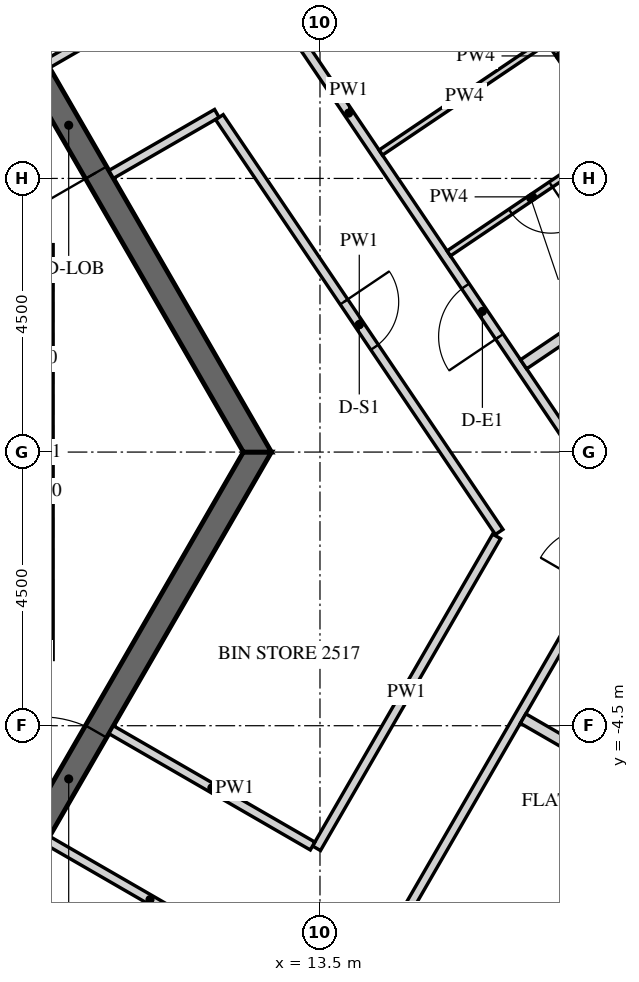
"""IFC4 building model, lengths in metres.
Left out: names, types, materials, properties, quantities, classifications, styles, units other than length and angle.
Written with IfcOpenShell. Run it as: python <this file> out.ifc"""

import sys

from ifc_helpers import new_model, si_unit, direction, frame, frame_2d, origin, place, context, subcontext, project, spatial, polyline, rectangle, outline, extrude, element, fill, save


model = new_model("IFC4")
c1 = context("Model", 3, precision=1e-05, world=origin(), true_north=direction((0.0, 1.0)))
c2 = subcontext(c1, "Body", "Model", "MODEL_VIEW")
j1 = project(units=[si_unit("LENGTHUNIT", "METRE"), si_unit("PLANEANGLEUNIT", "RADIAN")], contexts=[c1])
p1 = place(None, origin())
s1 = spatial("IfcSite", under=j1, at=p1, CompositionType="ELEMENT")
p2 = place(p1, origin())
s2 = spatial("IfcBuilding", under=s1, at=p2, CompositionType="ELEMENT")
p3 = place(p2, frame((0.0, 0.0, 314.7)))
s3 = spatial("IfcBuildingStorey", under=s2, at=p3, CompositionType="ELEMENT", Elevation=314.7)
p4 = place(p3, frame((16.451, -23.005, -0.15), z_axis=(0.0, 0.0, 1.0), x_axis=(0.500003737743, 0.866023245787, 0.0)))
e1 = element("IfcWall", 1, at=p4, inside=s3, PredefinedType="SOLIDWALL", context=c2, shape_type="SweptSolid", body=[
    extrude(outline(polyline([(-0.021, -0.25), (25.468, -0.25), (25.421, 0.25), (0.021, 0.25), (-0.021, -0.25)])), origin(), (0.0, 0.0, 1.0), 3.9),
])
p5 = place(p4, frame((2.522, 0.0, 0.75)))
e2 = element("IfcOpeningElement", 2, at=p5, cuts=e1, PredefinedType="OPENING", context=c2, shape_type="SweptSolid", body=[
    extrude(rectangle(XDim=2.4, YDim=2.7, at=frame_2d((1.2, 1.35))), frame((0.0, 0.26, 0.0), z_axis=(0.0, -1.0, 0.0), x_axis=(1.0, 0.0, 0.0)), (0.0, 0.0, 1.0), 0.52),
])
p6 = place(p4, frame((6.122, 0.0, 0.75)))
e3 = element("IfcOpeningElement", 3, at=p6, cuts=e1, PredefinedType="OPENING", context=c2, shape_type="SweptSolid", body=[
    extrude(rectangle(XDim=2.4, YDim=2.7, at=frame_2d((1.2, 1.35))), frame((0.0, 0.26, 0.0), z_axis=(0.0, -1.0, 0.0), x_axis=(1.0, 0.0, 0.0)), (0.0, 0.0, 1.0), 0.52),
])
p7 = place(p4, frame((9.722, 0.0, 0.75)))
e4 = element("IfcOpeningElement", 4, at=p7, cuts=e1, PredefinedType="OPENING", context=c2, shape_type="SweptSolid", body=[
    extrude(rectangle(XDim=2.4, YDim=2.7, at=frame_2d((1.2, 1.35))), frame((0.0, 0.26, 0.0), z_axis=(0.0, -1.0, 0.0), x_axis=(1.0, 0.0, 0.0)), (0.0, 0.0, 1.0), 0.52),
])
p8 = place(p4, frame((13.323, 0.0, 0.75)))
e5 = element("IfcOpeningElement", 5, at=p8, cuts=e1, PredefinedType="OPENING", context=c2, shape_type="SweptSolid", body=[
    extrude(rectangle(XDim=2.4, YDim=2.7, at=frame_2d((1.2, 1.35))), frame((0.0, 0.26, 0.0), z_axis=(0.0, -1.0, 0.0), x_axis=(1.0, 0.0, 0.0)), (0.0, 0.0, 1.0), 0.52),
])
p9 = place(p4, frame((16.922, 0.0, 0.75)))
e6 = element("IfcOpeningElement", 6, at=p9, cuts=e1, PredefinedType="OPENING", context=c2, shape_type="SweptSolid", body=[
    extrude(rectangle(XDim=2.4, YDim=2.7, at=frame_2d((1.2, 1.35))), frame((0.0, 0.26, 0.0), z_axis=(0.0, -1.0, 0.0), x_axis=(1.0, 0.0, 0.0)), (0.0, 0.0, 1.0), 0.52),
])
p10 = place(p4, frame((20.522, 0.0, 0.75)))
e7 = element("IfcOpeningElement", 7, at=p10, cuts=e1, PredefinedType="OPENING", context=c2, shape_type="SweptSolid", body=[
    extrude(rectangle(XDim=2.4, YDim=2.7, at=frame_2d((1.2, 1.35))), frame((0.0, 0.26, 0.0), z_axis=(0.0, -1.0, 0.0), x_axis=(1.0, 0.0, 0.0)), (0.0, 0.0, 1.0), 0.52),
])
p11 = place(p3, frame((26.706, 2.879, -0.15), z_axis=(0.0, 0.0, 1.0), x_axis=(-0.559197891507, 0.829034208061, 0.0)))
e8 = element("IfcWall", 8, at=p11, inside=s3, PredefinedType="SOLIDWALL", context=c2, shape_type="SweptSolid", body=[
    extrude(outline(polyline([(0.25, -0.25), (22.795, -0.25), (23.295, 0.25), (-0.25, 0.25), (0.25, -0.25)])), origin(), (0.0, 0.0, 1.0), 3.9),
])
p12 = place(p11, frame((1.323, 0.0, 1.05)))
e9 = element("IfcOpeningElement", 9, at=p12, cuts=e8, PredefinedType="OPENING", context=c2, shape_type="SweptSolid", body=[
    extrude(rectangle(XDim=0.9, YDim=1.5, at=frame_2d((0.45, 0.75))), frame((0.0, 0.26, 0.0), z_axis=(0.0, -1.0, 0.0), x_axis=(1.0, 0.0, 0.0)), (0.0, 0.0, 1.0), 0.52),
])
p13 = place(p11, frame((2.522, 0.0, 0.15)))
e10 = element("IfcOpeningElement", 10, at=p13, cuts=e8, PredefinedType="OPENING", context=c2, shape_type="SweptSolid", body=[
    extrude(rectangle(XDim=1.2, YDim=2.4, at=frame_2d((0.6, 1.2))), frame((0.0, 0.26, 0.0), z_axis=(0.0, -1.0, 0.0), x_axis=(1.0, 0.0, 0.0)), (0.0, 0.0, 1.0), 0.52),
])
p14 = place(p11, frame((4.922, 0.0, 1.05)))
e11 = element("IfcOpeningElement", 11, at=p14, cuts=e8, PredefinedType="OPENING", context=c2, shape_type="SweptSolid", body=[
    extrude(rectangle(XDim=0.9, YDim=1.5, at=frame_2d((0.45, 0.75))), frame((0.0, 0.26, 0.0), z_axis=(0.0, -1.0, 0.0), x_axis=(1.0, 0.0, 0.0)), (0.0, 0.0, 1.0), 0.52),
])
p15 = place(p11, frame((6.122, 0.0, 0.15)))
e12 = element("IfcOpeningElement", 12, at=p15, cuts=e8, PredefinedType="OPENING", context=c2, shape_type="SweptSolid", body=[
    extrude(rectangle(XDim=1.2, YDim=2.4, at=frame_2d((0.6, 1.2))), frame((0.0, 0.26, 0.0), z_axis=(0.0, -1.0, 0.0), x_axis=(1.0, 0.0, 0.0)), (0.0, 0.0, 1.0), 0.52),
])
p16 = place(p11, frame((8.522, 0.0, 1.05)))
e13 = element("IfcOpeningElement", 13, at=p16, cuts=e8, PredefinedType="OPENING", context=c2, shape_type="SweptSolid", body=[
    extrude(rectangle(XDim=0.9, YDim=1.5, at=frame_2d((0.45, 0.75))), frame((0.0, 0.26, 0.0), z_axis=(0.0, -1.0, 0.0), x_axis=(1.0, 0.0, 0.0)), (0.0, 0.0, 1.0), 0.52),
])
p17 = place(p11, frame((9.722, 0.0, 0.15)))
e14 = element("IfcOpeningElement", 14, at=p17, cuts=e8, PredefinedType="OPENING", context=c2, shape_type="SweptSolid", body=[
    extrude(rectangle(XDim=1.2, YDim=2.4, at=frame_2d((0.6, 1.2))), frame((0.0, 0.26, 0.0), z_axis=(0.0, -1.0, 0.0), x_axis=(1.0, 0.0, 0.0)), (0.0, 0.0, 1.0), 0.52),
])
p18 = place(p11, frame((12.122, 0.0, 1.05)))
e15 = element("IfcOpeningElement", 15, at=p18, cuts=e8, PredefinedType="OPENING", context=c2, shape_type="SweptSolid", body=[
    extrude(rectangle(XDim=0.9, YDim=1.5, at=frame_2d((0.45, 0.75))), frame((0.0, 0.26, 0.0), z_axis=(0.0, -1.0, 0.0), x_axis=(1.0, 0.0, 0.0)), (0.0, 0.0, 1.0), 0.52),
])
p19 = place(p11, frame((13.323, 0.0, 0.15)))
e16 = element("IfcOpeningElement", 16, at=p19, cuts=e8, PredefinedType="OPENING", context=c2, shape_type="SweptSolid", body=[
    extrude(rectangle(XDim=1.2, YDim=2.4, at=frame_2d((0.6, 1.2))), frame((0.0, 0.26, 0.0), z_axis=(0.0, -1.0, 0.0), x_axis=(1.0, 0.0, 0.0)), (0.0, 0.0, 1.0), 0.52),
])
p20 = place(p11, frame((15.722, 0.0, 1.05)))
e17 = element("IfcOpeningElement", 17, at=p20, cuts=e8, PredefinedType="OPENING", context=c2, shape_type="SweptSolid", body=[
    extrude(rectangle(XDim=0.9, YDim=1.5, at=frame_2d((0.45, 0.75))), frame((0.0, 0.26, 0.0), z_axis=(0.0, -1.0, 0.0), x_axis=(1.0, 0.0, 0.0)), (0.0, 0.0, 1.0), 0.52),
])
p21 = place(p11, frame((16.922, 0.0, 0.15)))
e18 = element("IfcOpeningElement", 18, at=p21, cuts=e8, PredefinedType="OPENING", context=c2, shape_type="SweptSolid", body=[
    extrude(rectangle(XDim=1.2, YDim=2.4, at=frame_2d((0.6, 1.2))), frame((0.0, 0.26, 0.0), z_axis=(0.0, -1.0, 0.0), x_axis=(1.0, 0.0, 0.0)), (0.0, 0.0, 1.0), 0.52),
])
p22 = place(p11, frame((19.323, 0.0, 1.05)))
e19 = element("IfcOpeningElement", 19, at=p22, cuts=e8, PredefinedType="OPENING", context=c2, shape_type="SweptSolid", body=[
    extrude(rectangle(XDim=0.9, YDim=1.5, at=frame_2d((0.45, 0.75))), frame((0.0, 0.26, 0.0), z_axis=(0.0, -1.0, 0.0), x_axis=(1.0, 0.0, 0.0)), (0.0, 0.0, 1.0), 0.52),
])
p23 = place(p11, frame((20.522, 0.0, 0.15)))
e20 = element("IfcOpeningElement", 20, at=p23, cuts=e8, PredefinedType="OPENING", context=c2, shape_type="SweptSolid", body=[
    extrude(rectangle(XDim=1.2, YDim=2.4, at=frame_2d((0.6, 1.2))), frame((0.0, 0.26, 0.0), z_axis=(0.0, -1.0, 0.0), x_axis=(1.0, 0.0, 0.0)), (0.0, 0.0, 1.0), 0.52),
])
p24 = place(p3, frame((6.235, -10.8, -0.15), z_axis=(0.0, 0.0, 1.0), x_axis=(0.499996419489, 0.866027470984, 0.0)))
e21 = element("IfcWall", 21, at=p24, inside=s3, PredefinedType="SHEAR", context=c2, shape_type="SweptSolid", body=[
    extrude(outline(polyline([(-0.115, -0.2), (12.586, -0.2), (12.355, 0.2), (0.115, 0.2), (-0.115, -0.2)])), origin(), (0.0, 0.0, 1.0), 3.9),
])
p25 = place(p24, frame((5.364, 0.0, 0.15)))
e22 = element("IfcOpeningElement", 22, at=p25, cuts=e21, PredefinedType="OPENING", context=c2, shape_type="SweptSolid", body=[
    extrude(rectangle(XDim=1.8, YDim=2.4, at=frame_2d((0.9, 1.2))), frame((0.0, 0.21, 0.0), z_axis=(0.0, -1.0, 0.0), x_axis=(1.0, 0.0, 0.0)), (0.0, 0.0, 1.0), 0.42),
])
p26 = place(p3, frame((12.471, 0.0, -0.15), z_axis=(0.0, 0.0, 1.0), x_axis=(-0.499996419489, 0.866027470984, 0.0)))
e23 = element("IfcWall", 23, at=p26, inside=s3, PredefinedType="SHEAR", context=c2, shape_type="SweptSolid", body=[
    extrude(outline(polyline([(-0.115, -0.2), (12.586, -0.2), (12.355, 0.2), (0.115, 0.2), (-0.115, -0.2)])), origin(), (0.0, 0.0, 1.0), 3.9),
])
p27 = place(p26, frame((5.306, 0.0, 0.15)))
e24 = element("IfcOpeningElement", 24, at=p27, cuts=e23, PredefinedType="OPENING", context=c2, shape_type="SweptSolid", body=[
    extrude(rectangle(XDim=1.8, YDim=2.4, at=frame_2d((0.9, 1.2))), frame((0.0, 0.21, 0.0), z_axis=(0.0, -1.0, 0.0), x_axis=(1.0, 0.0, 0.0)), (0.0, 0.0, 1.0), 0.42),
])
p28 = place(p3, frame((11.229, -13.951, 0.0), z_axis=(0.0, 0.0, 1.0), x_axis=(0.499997948852, 0.866026588012, 0.0)))
e25 = element("IfcWall", 25, at=p28, inside=s3, PredefinedType="PARTITIONING", context=c2, shape_type="SweptSolid", body=[
    extrude(rectangle(XDim=14.677, YDim=0.15, at=frame_2d((7.339, 0.0))), origin(), (0.0, 0.0, 1.0), 2.988),
])
p29 = place(p28, frame((1.0, 0.0, 0.0)))
e26 = element("IfcOpeningElement", 26, at=p29, cuts=e25, PredefinedType="OPENING", context=c2, shape_type="SweptSolid", body=[
    extrude(rectangle(XDim=1.0, YDim=2.1, at=frame_2d((0.5, 1.05))), frame((0.0, 0.085, 0.0), z_axis=(0.0, -1.0, 0.0), x_axis=(1.0, 0.0, 0.0)), (0.0, 0.0, 1.0), 0.17),
])
p30 = place(p28, frame((13.527, 0.0, 0.0)))
e27 = element("IfcOpeningElement", 27, at=p30, cuts=e25, PredefinedType="OPENING", context=c2, shape_type="SweptSolid", body=[
    extrude(rectangle(XDim=1.0, YDim=2.1, at=frame_2d((0.5, 1.05))), frame((0.0, 0.085, 0.0), z_axis=(0.0, -1.0, 0.0), x_axis=(1.0, 0.0, 0.0)), (0.0, 0.0, 1.0), 0.17),
])
p31 = place(p3, frame((18.521, -1.171, 0.0), z_axis=(0.0, 0.0, 1.0), x_axis=(-0.559193232449, 0.829037350656, 0.0)))
e28 = element("IfcWall", 28, at=p31, inside=s3, PredefinedType="PARTITIONING", context=c2, shape_type="SweptSolid", body=[
    extrude(rectangle(XDim=16.272, YDim=0.15, at=frame_2d((8.136, 0.0))), origin(), (0.0, 0.0, 1.0), 2.988),
])
p32 = place(p31, frame((3.703, 0.0, 0.0)))
e29 = element("IfcOpeningElement", 29, at=p32, cuts=e28, PredefinedType="OPENING", context=c2, shape_type="SweptSolid", body=[
    extrude(rectangle(XDim=1.0, YDim=2.1, at=frame_2d((0.5, 1.05))), frame((0.0, 0.085, 0.0), z_axis=(0.0, -1.0, 0.0), x_axis=(1.0, 0.0, 0.0)), (0.0, 0.0, 1.0), 0.17),
])
p33 = place(p3, frame((10.066, 4.566, 0.0), z_axis=(0.0, 0.0, 1.0), x_axis=(0.866033651025, 0.499985715088, 0.0)))
e30 = element("IfcWall", 30, at=p33, inside=s3, PredefinedType="PARTITIONING", context=c2, shape_type="SweptSolid", body=[
    extrude(rectangle(XDim=2.007, YDim=0.15, at=frame_2d((1.003, 0.0))), origin(), (0.0, 0.0, 1.0), 2.988),
])
p34 = place(p3, frame((11.846, 5.507, 0.0), z_axis=(0.0, 0.0, 1.0), x_axis=(0.559204754045, -0.829029579119, 0.0)))
e31 = element("IfcWall", 31, at=p34, inside=s3, PredefinedType="PARTITIONING", context=c2, shape_type="SweptSolid", body=[
    extrude(rectangle(XDim=8.228, YDim=0.15, at=frame_2d((4.114, 0.0))), origin(), (0.0, 0.0, 1.0), 2.988),
])
p35 = place(p34, frame((3.664, 0.0, 0.0)))
e32 = element("IfcOpeningElement", 32, at=p35, cuts=e31, PredefinedType="OPENING", context=c2, shape_type="SweptSolid", body=[
    extrude(rectangle(XDim=0.9, YDim=2.1, at=frame_2d((0.45, 1.05))), frame((0.0, 0.085, 0.0), z_axis=(0.0, -1.0, 0.0), x_axis=(1.0, 0.0, 0.0)), (0.0, 0.0, 1.0), 0.17),
])
p36 = place(p3, frame((16.405, -1.386, 0.0), z_axis=(0.0, 0.0, 1.0), x_axis=(-0.500026921216, -0.866009860255, 0.0)))
e33 = element("IfcWall", 33, at=p36, inside=s3, PredefinedType="PARTITIONING", context=c2, shape_type="SweptSolid", body=[
    extrude(rectangle(XDim=5.923, YDim=0.15, at=frame_2d((2.961, 0.0))), origin(), (0.0, 0.0, 1.0), 2.988),
])
p37 = place(p3, frame((13.378, -6.478, 0.0), z_axis=(0.0, 0.0, 1.0), x_axis=(-0.866011265228, 0.500024487898, 0.0)))
e34 = element("IfcWall", 34, at=p37, inside=s3, PredefinedType="PARTITIONING", context=c2, shape_type="SweptSolid", body=[
    extrude(rectangle(XDim=3.825, YDim=0.15, at=frame_2d((1.913, 0.0))), origin(), (0.0, 0.0, 1.0), 2.988),
])
p38 = place(p3, frame((9.016, -6.384, 0.0), z_axis=(0.0, 0.0, 1.0), x_axis=(0.866042777325, -0.499969906938, 0.0)))
e35 = element("IfcWall", 35, at=p38, inside=s3, PredefinedType="PARTITIONING", context=c2, shape_type="SweptSolid", body=[
    extrude(rectangle(XDim=3.9, YDim=0.15, at=frame_2d((1.95, 0.0))), origin(), (0.0, 0.0, 1.0), 2.988),
])
p39 = place(p3, frame((10.562, 7.277, 0.0), z_axis=(0.0, 0.0, 1.0), x_axis=(-0.86601248742, -0.500022371132, 0.0)))
e36 = element("IfcWall", 36, at=p39, inside=s3, PredefinedType="PARTITIONING", context=c2, shape_type="SweptSolid", body=[
    extrude(rectangle(XDim=1.785, YDim=0.15, at=frame_2d((0.893, 0.0))), origin(), (0.0, 0.0, 1.0), 2.988),
])
p40 = place(p3, frame((24.396, -8.745, 0.0), z_axis=(0.0, 0.0, 1.0), x_axis=(-0.866018297078, 0.500012308975, 0.0)))
e37 = element("IfcWall", 37, at=p40, inside=s3, PredefinedType="PARTITIONING", context=c2, shape_type="SweptSolid", body=[
    extrude(rectangle(XDim=8.725, YDim=0.18, at=frame_2d((4.362, 0.0))), origin(), (0.0, 0.0, 1.0), 2.988),
])
p41 = place(p3, frame((24.082, 6.323, 0.0), z_axis=(0.0, 0.0, 1.0), x_axis=(-0.829028989438, -0.559205628254, 0.0)))
e38 = element("IfcWall", 38, at=p41, inside=s3, PredefinedType="PARTITIONING", context=c2, shape_type="SweptSolid", body=[
    extrude(rectangle(XDim=8.725, YDim=0.18, at=frame_2d((4.363, 0.0))), origin(), (0.0, 0.0, 1.0), 2.988),
])
p42 = place(p3, frame((14.5, 4.926, 0.0), z_axis=(0.0, 0.0, 1.0), x_axis=(0.829067379225, 0.559148710725, 0.0)))
e39 = element("IfcWall", 39, at=p42, inside=s3, PredefinedType="PARTITIONING", context=c2, shape_type="SweptSolid", body=[
    extrude(rectangle(XDim=3.325, YDim=0.1, at=frame_2d((1.663, 0.0))), origin(), (0.0, 0.0, 1.0), 2.988),
])
p43 = place(p3, frame((17.284, 6.743, 0.0), z_axis=(0.0, 0.0, 1.0), x_axis=(0.55897906803, -0.829181766263, 0.0)))
e40 = element("IfcWall", 40, at=p43, inside=s3, PredefinedType="PARTITIONING", context=c2, shape_type="SweptSolid", body=[
    extrude(rectangle(XDim=0.552, YDim=0.1, at=frame_2d((0.276, 0.0))), origin(), (0.0, 0.0, 1.0), 2.988),
])
p44 = place(p3, frame((18.375, 5.127, 0.0), z_axis=(0.0, 0.0, 1.0), x_axis=(-0.82903334026, -0.559199178055, 0.0)))
e41 = element("IfcWall", 41, at=p44, inside=s3, PredefinedType="PARTITIONING", context=c2, shape_type="SweptSolid", body=[
    extrude(rectangle(XDim=3.325, YDim=0.1, at=frame_2d((1.663, 0.0))), origin(), (0.0, 0.0, 1.0), 2.988),
])
p45 = place(p44, frame((1.3, 0.0, 0.0)))
e42 = element("IfcOpeningElement", 42, at=p45, cuts=e41, PredefinedType="OPENING", context=c2, shape_type="SweptSolid", body=[
    extrude(rectangle(XDim=0.8, YDim=2.1, at=frame_2d((0.4, 1.05))), frame((0.0, 0.06, 0.0), z_axis=(0.0, -1.0, 0.0), x_axis=(1.0, 0.0, 0.0)), (0.0, 0.0, 1.0), 0.12),
])
p46 = place(p27, origin())
e43 = element("IfcDoor", 43, at=p46, inside=s3, OperationType="DOUBLE_DOOR_SINGLE_SWING", PredefinedType="DOOR", context=c2, shape_type="SweptSolid", body=[
    extrude(rectangle(XDim=1.8, YDim=2.4, at=frame_2d((0.9, 1.2))), frame((0.0, 0.025, 0.0), z_axis=(0.0, -1.0, 0.0), x_axis=(1.0, 0.0, 0.0)), (0.0, 0.0, 1.0), 0.05),
])
fill(e24, e43)
p47 = place(p25, origin())
e44 = element("IfcDoor", 44, at=p47, inside=s3, OperationType="DOUBLE_DOOR_SINGLE_SWING", PredefinedType="DOOR", context=c2, shape_type="SweptSolid", body=[
    extrude(rectangle(XDim=1.8, YDim=2.4, at=frame_2d((0.9, 1.2))), frame((0.0, 0.025, 0.0), z_axis=(0.0, -1.0, 0.0), x_axis=(1.0, 0.0, 0.0)), (0.0, 0.0, 1.0), 0.05),
])
fill(e22, e44)
p48 = place(p32, origin())
e45 = element("IfcDoor", 45, at=p48, inside=s3, OperationType="SINGLE_SWING_RIGHT", PredefinedType="DOOR", context=c2, shape_type="SweptSolid", body=[
    extrude(rectangle(XDim=1.0, YDim=2.1, at=frame_2d((0.5, 1.05))), frame((0.0, 0.025, 0.0), z_axis=(0.0, -1.0, 0.0), x_axis=(1.0, 0.0, 0.0)), (0.0, 0.0, 1.0), 0.05),
])
fill(e29, e45)
p49 = place(p45, origin())
e46 = element("IfcDoor", 46, at=p49, inside=s3, OperationType="SINGLE_SWING_LEFT", PredefinedType="DOOR", context=c2, shape_type="SweptSolid", body=[
    extrude(rectangle(XDim=0.8, YDim=2.1, at=frame_2d((0.4, 1.05))), frame((0.0, 0.025, 0.0), z_axis=(0.0, -1.0, 0.0), x_axis=(1.0, 0.0, 0.0)), (0.0, 0.0, 1.0), 0.05),
])
fill(e42, e46)
p50 = place(p35, origin())
e47 = element("IfcDoor", 47, at=p50, inside=s3, OperationType="SINGLE_SWING_LEFT", PredefinedType="DOOR", context=c2, shape_type="SweptSolid", body=[
    extrude(rectangle(XDim=0.9, YDim=2.1, at=frame_2d((0.45, 1.05))), frame((0.0, 0.025, 0.0), z_axis=(0.0, -1.0, 0.0), x_axis=(1.0, 0.0, 0.0)), (0.0, 0.0, 1.0), 0.05),
])
fill(e32, e47)
save(model, sys.argv[1])
